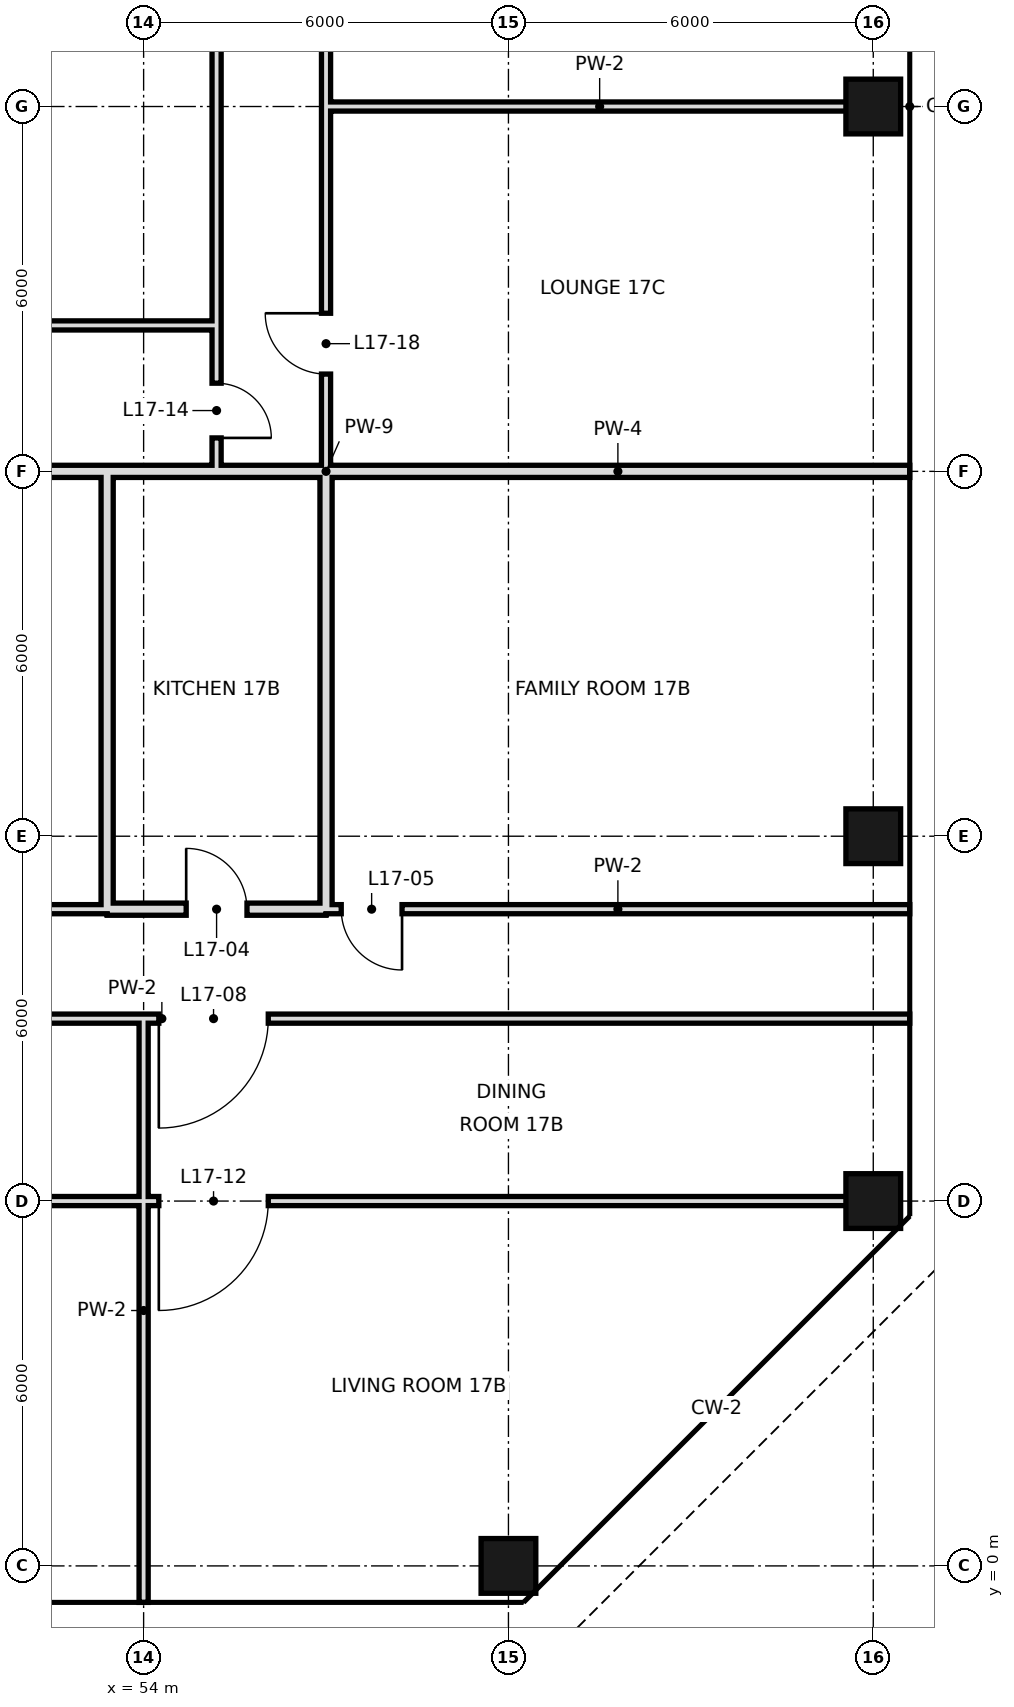
"""IFC4 building model, lengths in metres.
Left out: names, types, materials, properties, quantities, classifications, styles, units other than length and angle.
Written with IfcOpenShell. Run it as: python <this file> out.ifc"""

import sys

from ifc_helpers import new_model, si_unit, direction, frame, frame_2d, origin, origin_2d, place, context, subcontext, project, spatial, rectangle, hollow_rectangle, extrude, element, fill, save


model = new_model("IFC4")
c1 = context("Model", 3, precision=1e-05, world=origin(), true_north=direction((0.0, 1.0)))
c2 = subcontext(c1, "Body", "Model", "MODEL_VIEW")
j1 = project(units=[si_unit("LENGTHUNIT", "METRE"), si_unit("PLANEANGLEUNIT", "RADIAN")], contexts=[c1])
p1 = place(None, origin())
s1 = spatial("IfcSite", under=j1, at=p1, CompositionType="ELEMENT")
p2 = place(p1, origin())
s2 = spatial("IfcBuilding", under=s1, at=p2, CompositionType="ELEMENT")
p3 = place(p2, frame((0.0, 0.0, 82.2)))
s3 = spatial("IfcBuildingStorey", under=s2, at=p3, CompositionType="ELEMENT", Elevation=82.2)
for number, where, z_axis, x_axis in (
    (1, (60.0, 0.0, 0.0), (0.0, 0.0, 1.0), (1.0, 0.0, 0.0)),
    (2, (66.0, 6.0, 0.0), (0.0, 0.0, 1.0), (1.0, 0.0, 0.0)),
    (3, (66.0, 12.0, 0.0), (0.0, 0.0, 1.0), (1.0, 0.0, 0.0)),
    (4, (66.0, 24.0, 0.0), (0.0, 0.0, 1.0), (1.0, 0.0, 0.0)),
):
    element("IfcColumn", number, at=place(p3, frame(where, z_axis=z_axis, x_axis=x_axis)), inside=s3, PredefinedType="COLUMN", context=c2, shape_type="SweptSolid", body=[
        extrude(hollow_rectangle(XDim=0.9, YDim=0.9, WallThickness=0.045, at=origin_2d()), origin(), (0.0, 0.0, 1.0), 3.6),
    ])
p4 = place(p3, frame((53.4, 10.8, 0.0), z_axis=(0.0, 0.0, 1.0), x_axis=(0.0, 1.0, 0.0)))
e5 = element("IfcWall", 5, at=p4, inside=s3, PredefinedType="SOLIDWALL", context=c2, shape_type="SweptSolid", body=[
    extrude(rectangle(XDim=7.2, YDim=0.2, at=frame_2d((3.6, 0.0))), origin(), (0.0, 0.0, 1.0), 2.52),
])
p5 = place(p3, frame((54.0, -0.6, 0.0), z_axis=(0.0, 0.0, 1.0), x_axis=(0.0, 1.0, 0.0)))
e6 = element("IfcWall", 6, at=p5, inside=s3, PredefinedType="PARTITIONING", context=c2, shape_type="SweptSolid", body=[
    extrude(rectangle(XDim=9.6, YDim=0.15, at=frame_2d((4.8, 0.0))), origin(), (0.0, 0.0, 1.0), 3.42),
])
p6 = place(p3, frame((55.2, 20.4, 0.0), z_axis=(0.0, 0.0, 1.0), x_axis=(0.0, 1.0, 0.0)))
e7 = element("IfcWall", 7, at=p6, inside=s3, PredefinedType="PARTITIONING", context=c2, shape_type="SweptSolid", body=[
    extrude(rectangle(XDim=23.4, YDim=0.15, at=frame_2d((11.7, 0.0))), origin(), (0.0, 0.0, 1.0), 3.42),
])
p7 = place(p6, frame((20.68, 0.0, 0.0)))
e8 = element("IfcOpeningElement", 8, at=p7, cuts=e7, PredefinedType="OPENING", context=c2, shape_type="SweptSolid", body=[
    extrude(rectangle(XDim=1.0, YDim=2.4, at=frame_2d((0.5, 1.2))), frame((0.0, 0.085, 0.0), z_axis=(0.0, -1.0, 0.0), x_axis=(1.0, 0.0, 0.0)), (0.0, 0.0, 1.0), 0.17),
])
p8 = place(p6, frame((5.08, 0.0, 0.0)))
e9 = element("IfcOpeningElement", 9, at=p8, cuts=e7, PredefinedType="OPENING", context=c2, shape_type="SweptSolid", body=[
    extrude(rectangle(XDim=1.0, YDim=2.4, at=frame_2d((0.5, 1.2))), frame((0.0, 0.085, 0.0), z_axis=(0.0, -1.0, 0.0), x_axis=(1.0, 0.0, 0.0)), (0.0, 0.0, 1.0), 0.17),
])
p9 = place(p6, frame((15.58, 0.0, 0.0)))
e10 = element("IfcOpeningElement", 10, at=p9, cuts=e7, PredefinedType="OPENING", context=c2, shape_type="SweptSolid", body=[
    extrude(rectangle(XDim=1.0, YDim=2.4, at=frame_2d((0.5, 1.2))), frame((0.0, 0.085, 0.0), z_axis=(0.0, -1.0, 0.0), x_axis=(1.0, 0.0, 0.0)), (0.0, 0.0, 1.0), 0.17),
])
p10 = place(p3, frame((55.2, 18.0, 0.0), z_axis=(0.0, 0.0, 1.0), x_axis=(0.0, 1.0, 0.0)))
e11 = element("IfcWall", 11, at=p10, inside=s3, PredefinedType="PARTITIONING", context=c2, shape_type="SweptSolid", body=[
    extrude(rectangle(XDim=2.4, YDim=0.15, at=frame_2d((1.2, 0.0))), origin(), (0.0, 0.0, 1.0), 3.42),
])
p11 = place(p10, frame((0.55, 0.0, 0.0)))
e12 = element("IfcOpeningElement", 12, at=p11, cuts=e11, PredefinedType="OPENING", context=c2, shape_type="SweptSolid", body=[
    extrude(rectangle(XDim=0.9, YDim=2.4, at=frame_2d((0.45, 1.2))), frame((0.0, 0.085, 0.0), z_axis=(0.0, -1.0, 0.0), x_axis=(1.0, 0.0, 0.0)), (0.0, 0.0, 1.0), 0.17),
])
p12 = place(p3, frame((57.0, 10.8, 0.0), z_axis=(0.0, 0.0, 1.0), x_axis=(0.0, 1.0, 0.0)))
e13 = element("IfcWall", 13, at=p12, inside=s3, PredefinedType="SOLIDWALL", context=c2, shape_type="SweptSolid", body=[
    extrude(rectangle(XDim=7.2, YDim=0.2, at=frame_2d((3.6, 0.0))), origin(), (0.0, 0.0, 1.0), 2.52),
])
p13 = place(p3, frame((57.0, 18.0, 0.0), z_axis=(0.0, 0.0, 1.0), x_axis=(0.0, 1.0, 0.0)))
e14 = element("IfcWall", 14, at=p13, inside=s3, PredefinedType="PARTITIONING", context=c2, shape_type="SweptSolid", body=[
    extrude(rectangle(XDim=15.0, YDim=0.15, at=frame_2d((7.5, 0.0))), origin(), (0.0, 0.0, 1.0), 3.42),
])
p14 = place(p13, frame((1.6, 0.0, 0.0)))
e15 = element("IfcOpeningElement", 15, at=p14, cuts=e14, PredefinedType="OPENING", context=c2, shape_type="SweptSolid", body=[
    extrude(rectangle(XDim=1.0, YDim=2.4, at=frame_2d((0.5, 1.2))), frame((0.0, 0.085, 0.0), z_axis=(0.0, -1.0, 0.0), x_axis=(1.0, 0.0, 0.0)), (0.0, 0.0, 1.0), 0.17),
])
p15 = place(p13, frame((9.4, 0.0, 0.0)))
e16 = element("IfcOpeningElement", 16, at=p15, cuts=e14, PredefinedType="OPENING", context=c2, shape_type="SweptSolid", body=[
    extrude(rectangle(XDim=1.0, YDim=2.4, at=frame_2d((0.5, 1.2))), frame((0.0, 0.085, 0.0), z_axis=(0.0, -1.0, 0.0), x_axis=(1.0, 0.0, 0.0)), (0.0, 0.0, 1.0), 0.17),
])
p16 = place(p13, frame((13.0, 0.0, 0.0)))
e17 = element("IfcOpeningElement", 17, at=p16, cuts=e14, PredefinedType="OPENING", context=c2, shape_type="SweptSolid", body=[
    extrude(rectangle(XDim=1.0, YDim=2.4, at=frame_2d((0.5, 1.2))), frame((0.0, 0.085, 0.0), z_axis=(0.0, -1.0, 0.0), x_axis=(1.0, 0.0, 0.0)), (0.0, 0.0, 1.0), 0.17),
])
p17 = place(p3, frame((53.4, 10.8, 0.0), z_axis=(0.0, 0.0, 1.0), x_axis=(1.0, 0.0, 0.0)))
e18 = element("IfcWall", 18, at=p17, inside=s3, PredefinedType="SOLIDWALL", context=c2, shape_type="SweptSolid", body=[
    extrude(rectangle(XDim=3.6, YDim=0.2, at=frame_2d((1.8, 0.0))), origin(), (0.0, 0.0, 1.0), 3.42),
])
p18 = place(p17, frame((1.3, 0.0, 0.0)))
e19 = element("IfcOpeningElement", 19, at=p18, cuts=e18, PredefinedType="OPENING", context=c2, shape_type="SweptSolid", body=[
    extrude(rectangle(XDim=1.0, YDim=2.4, at=frame_2d((0.5, 1.2))), frame((0.0, 0.11, 0.0), z_axis=(0.0, -1.0, 0.0), x_axis=(1.0, 0.0, 0.0)), (0.0, 0.0, 1.0), 0.22),
])
p19 = place(p3, frame((44.4, 10.8, 0.0), z_axis=(0.0, 0.0, 1.0), x_axis=(1.0, 0.0, 0.0)))
e20 = element("IfcWall", 20, at=p19, inside=s3, PredefinedType="PARTITIONING", context=c2, shape_type="SweptSolid", body=[
    extrude(rectangle(XDim=9.0, YDim=0.15, at=frame_2d((4.5, 0.0))), origin(), (0.0, 0.0, 1.0), 3.42),
])
p20 = place(p19, frame((5.5, 0.0, 0.0)))
e21 = element("IfcOpeningElement", 21, at=p20, cuts=e20, PredefinedType="OPENING", context=c2, shape_type="SweptSolid", body=[
    extrude(rectangle(XDim=1.0, YDim=2.4, at=frame_2d((0.5, 1.2))), frame((0.0, 0.085, 0.0), z_axis=(0.0, -1.0, 0.0), x_axis=(1.0, 0.0, 0.0)), (0.0, 0.0, 1.0), 0.17),
])
p21 = place(p3, frame((57.0, 10.8, 0.0), z_axis=(0.0, 0.0, 1.0), x_axis=(1.0, 0.0, 0.0)))
e22 = element("IfcWall", 22, at=p21, inside=s3, PredefinedType="PARTITIONING", context=c2, shape_type="SweptSolid", body=[
    extrude(rectangle(XDim=9.6, YDim=0.15, at=frame_2d((4.8, 0.0))), origin(), (0.0, 0.0, 1.0), 3.42),
])
p22 = place(p21, frame((0.25, 0.0, 0.0)))
e23 = element("IfcOpeningElement", 23, at=p22, cuts=e22, PredefinedType="OPENING", context=c2, shape_type="SweptSolid", body=[
    extrude(rectangle(XDim=1.0, YDim=2.4, at=frame_2d((0.5, 1.2))), frame((0.0, 0.085, 0.0), z_axis=(0.0, -1.0, 0.0), x_axis=(1.0, 0.0, 0.0)), (0.0, 0.0, 1.0), 0.17),
])
p23 = place(p3, frame((53.4, 18.0, 0.0), z_axis=(0.0, 0.0, 1.0), x_axis=(1.0, 0.0, 0.0)))
e24 = element("IfcWall", 24, at=p23, inside=s3, PredefinedType="SOLIDWALL", context=c2, shape_type="SweptSolid", body=[
    extrude(rectangle(XDim=3.6, YDim=0.2, at=frame_2d((1.8, 0.0))), origin(), (0.0, 0.0, 1.0), 2.52),
])
p24 = place(p3, frame((44.9, 18.0, 0.0), z_axis=(0.0, 0.0, 1.0), x_axis=(1.0, 0.0, 0.0)))
e25 = element("IfcWall", 25, at=p24, inside=s3, PredefinedType="SOLIDWALL", context=c2, shape_type="SweptSolid", body=[
    extrude(rectangle(XDim=8.5, YDim=0.2, at=frame_2d((4.25, 0.0))), origin(), (0.0, 0.0, 1.0), 2.52),
])
p25 = place(p3, frame((57.0, 18.0, 0.0), z_axis=(0.0, 0.0, 1.0), x_axis=(1.0, 0.0, 0.0)))
e26 = element("IfcWall", 26, at=p25, inside=s3, PredefinedType="SOLIDWALL", context=c2, shape_type="SweptSolid", body=[
    extrude(rectangle(XDim=9.6, YDim=0.2, at=frame_2d((4.8, 0.0))), origin(), (0.0, 0.0, 1.0), 2.52),
])
p26 = place(p3, frame((44.9, 20.4, 0.0), z_axis=(0.0, 0.0, 1.0), x_axis=(1.0, 0.0, 0.0)))
e27 = element("IfcWall", 27, at=p26, inside=s3, PredefinedType="PARTITIONING", context=c2, shape_type="SweptSolid", body=[
    extrude(rectangle(XDim=10.3, YDim=0.15, at=frame_2d((5.15, 0.0))), origin(), (0.0, 0.0, 1.0), 3.42),
])
p27 = place(p3, frame((57.0, 24.0, 0.0), z_axis=(0.0, 0.0, 1.0), x_axis=(1.0, 0.0, 0.0)))
e28 = element("IfcWall", 28, at=p27, inside=s3, PredefinedType="PARTITIONING", context=c2, shape_type="SweptSolid", body=[
    extrude(rectangle(XDim=9.0, YDim=0.15, at=frame_2d((4.5, 0.0))), origin(), (0.0, 0.0, 1.0), 2.52),
])
p28 = place(p3, frame((42.0, 6.0, 0.0), z_axis=(0.0, 0.0, 1.0), x_axis=(1.0, 0.0, 0.0)))
e29 = element("IfcWall", 29, at=p28, inside=s3, PredefinedType="PARTITIONING", context=c2, shape_type="SweptSolid", body=[
    extrude(rectangle(XDim=24.0, YDim=0.15, at=frame_2d((12.0, 0.0))), origin(), (0.0, 0.0, 1.0), 2.52),
])
p29 = place(p28, frame((7.6, 0.0, 0.0)))
e30 = element("IfcOpeningElement", 30, at=p29, cuts=e29, PredefinedType="OPENING", context=c2, shape_type="SweptSolid", body=[
    extrude(rectangle(XDim=1.0, YDim=2.4, at=frame_2d((0.5, 1.2))), frame((0.0, 0.085, 0.0), z_axis=(0.0, -1.0, 0.0), x_axis=(1.0, 0.0, 0.0)), (0.0, 0.0, 1.0), 0.17),
])
p30 = place(p28, frame((12.25, 0.0, 0.0)))
e31 = element("IfcOpeningElement", 31, at=p30, cuts=e29, PredefinedType="OPENING", context=c2, shape_type="SweptSolid", body=[
    extrude(rectangle(XDim=1.8, YDim=2.4, at=frame_2d((0.9, 1.2))), frame((0.0, 0.085, 0.0), z_axis=(0.0, -1.0, 0.0), x_axis=(1.0, 0.0, 0.0)), (0.0, 0.0, 1.0), 0.17),
])
p31 = place(p3, frame((42.0, 9.0, 0.0), z_axis=(0.0, 0.0, 1.0), x_axis=(1.0, 0.0, 0.0)))
e32 = element("IfcWall", 32, at=p31, inside=s3, PredefinedType="PARTITIONING", context=c2, shape_type="SweptSolid", body=[
    extrude(rectangle(XDim=24.6, YDim=0.15, at=frame_2d((12.3, 0.0))), origin(), (0.0, 0.0, 1.0), 3.42),
])
p32 = place(p31, frame((5.5, 0.0, 0.0)))
e33 = element("IfcOpeningElement", 33, at=p32, cuts=e32, PredefinedType="OPENING", context=c2, shape_type="SweptSolid", body=[
    extrude(rectangle(XDim=1.0, YDim=2.4, at=frame_2d((0.5, 1.2))), frame((0.0, 0.085, 0.0), z_axis=(0.0, -1.0, 0.0), x_axis=(1.0, 0.0, 0.0)), (0.0, 0.0, 1.0), 0.17),
])
p33 = place(p31, frame((12.25, 0.0, 0.0)))
e34 = element("IfcOpeningElement", 34, at=p33, cuts=e32, PredefinedType="OPENING", context=c2, shape_type="SweptSolid", body=[
    extrude(rectangle(XDim=1.8, YDim=2.4, at=frame_2d((0.9, 1.2))), frame((0.0, 0.085, 0.0), z_axis=(0.0, -1.0, 0.0), x_axis=(1.0, 0.0, 0.0)), (0.0, 0.0, 1.0), 0.17),
])
p34 = place(p18, origin())
e35 = element("IfcDoor", 35, at=p34, inside=s3, OperationType="SINGLE_SWING_LEFT", PredefinedType="DOOR", context=c2, shape_type="SweptSolid", body=[
    extrude(rectangle(XDim=1.0, YDim=2.4, at=frame_2d((0.5, 1.2))), frame((0.0, 0.025, 0.0), z_axis=(0.0, -1.0, 0.0), x_axis=(1.0, 0.0, 0.0)), (0.0, 0.0, 1.0), 0.05),
])
fill(e19, e35)
p35 = place(p22, origin())
e36 = element("IfcDoor", 36, at=p35, inside=s3, OperationType="SINGLE_SWING_RIGHT", PredefinedType="DOOR", context=c2, shape_type="SweptSolid", body=[
    extrude(rectangle(XDim=1.0, YDim=2.4, at=frame_2d((0.5, 1.2))), frame((0.0, 0.025, 0.0), z_axis=(0.0, -1.0, 0.0), x_axis=(1.0, 0.0, 0.0)), (0.0, 0.0, 1.0), 0.05),
])
fill(e23, e36)
p36 = place(p33, frame((1.8, 0.0, 0.0), z_axis=(0.0, 0.0, 1.0), x_axis=(-1.0, 0.0, 0.0)))
e37 = element("IfcDoor", 37, at=p36, inside=s3, OperationType="SINGLE_SWING_RIGHT", PredefinedType="DOOR", context=c2, shape_type="SweptSolid", body=[
    extrude(rectangle(XDim=1.8, YDim=2.4, at=frame_2d((0.9, 1.2))), frame((0.0, 0.025, 0.0), z_axis=(0.0, -1.0, 0.0), x_axis=(1.0, 0.0, 0.0)), (0.0, 0.0, 1.0), 0.05),
])
fill(e34, e37)
p37 = place(p30, frame((1.8, 0.0, 0.0), z_axis=(0.0, 0.0, 1.0), x_axis=(-1.0, 0.0, 0.0)))
e38 = element("IfcDoor", 38, at=p37, inside=s3, OperationType="SINGLE_SWING_RIGHT", PredefinedType="DOOR", context=c2, shape_type="SweptSolid", body=[
    extrude(rectangle(XDim=1.8, YDim=2.4, at=frame_2d((0.9, 1.2))), frame((0.0, 0.025, 0.0), z_axis=(0.0, -1.0, 0.0), x_axis=(1.0, 0.0, 0.0)), (0.0, 0.0, 1.0), 0.05),
])
fill(e31, e38)
p38 = place(p11, frame((0.9, 0.0, 0.0), z_axis=(0.0, 0.0, 1.0), x_axis=(-1.0, 0.0, 0.0)))
e39 = element("IfcDoor", 39, at=p38, inside=s3, OperationType="SINGLE_SWING_RIGHT", PredefinedType="DOOR", context=c2, shape_type="SweptSolid", body=[
    extrude(rectangle(XDim=0.9, YDim=2.4, at=frame_2d((0.45, 1.2))), frame((0.0, 0.025, 0.0), z_axis=(0.0, -1.0, 0.0), x_axis=(1.0, 0.0, 0.0)), (0.0, 0.0, 1.0), 0.05),
])
fill(e12, e39)
p39 = place(p14, frame((1.0, 0.0, 0.0), z_axis=(0.0, 0.0, 1.0), x_axis=(-1.0, 0.0, 0.0)))
e40 = element("IfcDoor", 40, at=p39, inside=s3, OperationType="SINGLE_SWING_LEFT", PredefinedType="DOOR", context=c2, shape_type="SweptSolid", body=[
    extrude(rectangle(XDim=1.0, YDim=2.4, at=frame_2d((0.5, 1.2))), frame((0.0, 0.025, 0.0), z_axis=(0.0, -1.0, 0.0), x_axis=(1.0, 0.0, 0.0)), (0.0, 0.0, 1.0), 0.05),
])
fill(e15, e40)
save(model, sys.argv[1])
